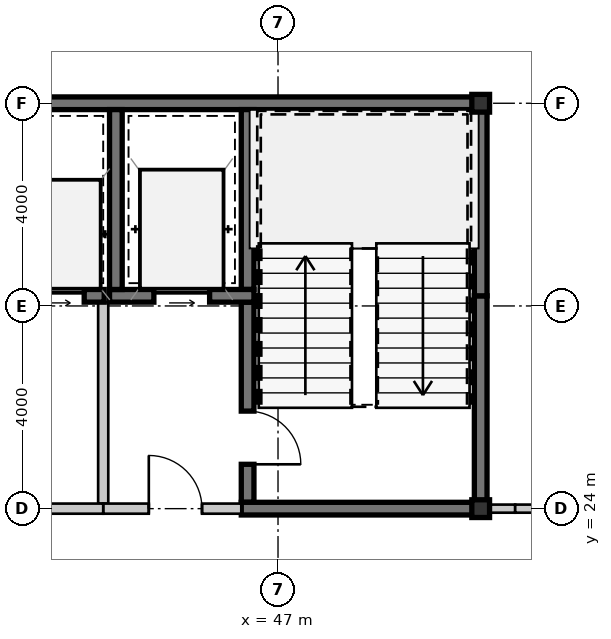
"""IFC4 building model, lengths in metres.
Left out: names, types, materials, properties, quantities, classifications, styles, units other than length and angle.
Written with IfcOpenShell. Run it as: python <this file> out.ifc"""

import sys

from ifc_helpers import new_model, si_unit, direction, frame, frame_2d, origin, origin_2d, place, context, subcontext, project, spatial, rectangle, hollow_rectangle, extrude, source, transform, mapped, element, fill, save


model = new_model("IFC4")
c1 = context("Model", 3, precision=1e-05, world=origin(), true_north=direction((0.0, 1.0)))
c2 = subcontext(c1, "Body", "Model", "MODEL_VIEW")
j1 = project(units=[si_unit("LENGTHUNIT", "METRE"), si_unit("PLANEANGLEUNIT", "RADIAN")], contexts=[c1])
p1 = place(None, origin())
s1 = spatial("IfcSite", under=j1, at=p1, CompositionType="ELEMENT")
p2 = place(p1, origin())
s2 = spatial("IfcBuilding", under=s1, at=p2, CompositionType="ELEMENT")
p3 = place(p2, frame((0.0, 0.0, 168.7)))
s3 = spatial("IfcBuildingStorey", under=s2, at=p3, CompositionType="ELEMENT", Elevation=168.7)
m1 = source(origin(), c2, "Body", "SweptSolid", [
    extrude(hollow_rectangle(XDim=0.35, YDim=0.35, WallThickness=0.016, at=origin_2d()), origin(), (0.0, 0.0, 1.0), 3.85),
])
for number, where, z_axis, x_axis in (
    (1, (51.0, 24.0, 0.0), (0.0, 0.0, 1.0), (1.0, 0.0, 0.0)),
    (2, (51.0, 32.0, 0.0), (0.0, 0.0, 1.0), (1.0, 0.0, 0.0)),
):
    element("IfcColumn", number, at=place(p3, frame(where, z_axis=z_axis, x_axis=x_axis)), inside=s3, PredefinedType="COLUMN", context=c2, shape_type="MappedRepresentation", body=[
        mapped(m1, transform((0.0, 0.0, 0.0), scale=1.0)),
    ])
m2 = source(origin(), c2, "Body", "SweptSolid", [
    extrude(rectangle(XDim=11.925, YDim=0.25, at=frame_2d((5.962, 0.0))), origin(), (0.0, 0.0, 1.0), 3.63),
])
p4 = place(p3, frame((39.2, 32.0, 0.0), z_axis=(0.0, 0.0, 1.0), x_axis=(1.0, 0.0, 0.0)))
e3 = element("IfcWall", 3, at=p4, inside=s3, PredefinedType="SHEAR", context=c2, shape_type="MappedRepresentation", body=[
    mapped(m2, transform((0.0, 0.0, 0.0), scale=1.0)),
])
m3 = source(origin(), c2, "Body", "SweptSolid", [
    extrude(rectangle(XDim=4.075, YDim=0.25, at=frame_2d((2.038, 0.0))), origin(), (0.0, 0.0, 1.0), 3.63),
])
p5 = place(p3, frame((51.0, 24.125, 0.0), z_axis=(0.0, 0.0, 1.0), x_axis=(0.0, 1.0, 0.0)))
e4 = element("IfcWall", 4, at=p5, inside=s3, PredefinedType="SHEAR", context=c2, shape_type="MappedRepresentation", body=[
    mapped(m3, transform((0.0, 0.0, 0.0), scale=1.0)),
])
m4 = source(origin(), c2, "Body", "SweptSolid", [
    extrude(rectangle(XDim=3.675, YDim=0.25, at=frame_2d((1.837, 0.0))), origin(), (0.0, 0.0, 1.0), 3.63),
])
p6 = place(p3, frame((51.0, 28.2, 0.0), z_axis=(0.0, 0.0, 1.0), x_axis=(0.0, 1.0, 0.0)))
e5 = element("IfcWall", 5, at=p6, inside=s3, PredefinedType="SHEAR", context=c2, shape_type="MappedRepresentation", body=[
    mapped(m4, transform((0.0, 0.0, 0.0), scale=1.0)),
])
m5 = source(origin(), c2, "Body", "SweptSolid", [
    extrude(rectangle(XDim=3.55, YDim=0.25, at=frame_2d((1.775, 0.0))), origin(), (0.0, 0.0, 1.0), 3.63),
])
p7 = place(p3, frame((46.4, 31.875, 0.0), z_axis=(0.0, 0.0, 1.0), x_axis=(0.0, -1.0, 0.0)))
e6 = element("IfcWall", 6, at=p7, inside=s3, PredefinedType="SHEAR", context=c2, shape_type="MappedRepresentation", body=[
    mapped(m5, transform((0.0, 0.0, 0.0), scale=1.0)),
])
m6 = source(origin(), c2, "Body", "SweptSolid", [
    extrude(rectangle(XDim=3.95, YDim=0.25, at=frame_2d((1.975, 0.0))), origin(), (0.0, 0.0, 1.0), 3.63),
])
p8 = place(p3, frame((46.4, 28.075, 0.0), z_axis=(0.0, 0.0, 1.0), x_axis=(0.0, -1.0, 0.0)))
e7 = element("IfcWall", 7, at=p8, inside=s3, PredefinedType="SHEAR", context=c2, shape_type="MappedRepresentation", body=[
    mapped(m6, transform((0.0, 0.0, 0.0), scale=1.0)),
])
m7 = source(origin(), c2, "Body", "SweptSolid", [
    extrude(rectangle(XDim=1.05, YDim=2.1, at=frame_2d((0.525, 1.05))), frame((0.0, 0.135, 0.0), z_axis=(0.0, -1.0, 0.0), x_axis=(1.0, 0.0, 0.0)), (0.0, 0.0, 1.0), 0.27),
])
p9 = place(p8, frame((2.15, 0.0, 0.0)))
e8 = element("IfcOpeningElement", 8, at=p9, cuts=e7, PredefinedType="OPENING", context=c2, shape_type="MappedRepresentation", body=[
    mapped(m7, transform((0.0, 0.0, 0.0), scale=1.0)),
])
m8 = source(origin(), c2, "Body", "SweptSolid", [
    extrude(rectangle(XDim=4.85, YDim=0.25, at=frame_2d((2.425, 0.0))), origin(), (0.0, 0.0, 1.0), 3.63),
])
p10 = place(p3, frame((46.275, 24.0, 0.0), z_axis=(0.0, 0.0, 1.0), x_axis=(1.0, 0.0, 0.0)))
e9 = element("IfcWall", 9, at=p10, inside=s3, PredefinedType="SHEAR", context=c2, shape_type="MappedRepresentation", body=[
    mapped(m8, transform((0.0, 0.0, 0.0), scale=1.0)),
])
m9 = source(origin(), c2, "Body", "SweptSolid", [
    extrude(rectangle(XDim=2.85, YDim=0.25, at=frame_2d((1.425, 0.0))), origin(), (0.0, 0.0, 1.0), 3.63),
])
p11 = place(p3, frame((43.675, 28.2, 0.0), z_axis=(0.0, 0.0, 1.0), x_axis=(1.0, 0.0, 0.0)))
e10 = element("IfcWall", 10, at=p11, inside=s3, PredefinedType="SHEAR", context=c2, shape_type="MappedRepresentation", body=[
    mapped(m9, transform((0.0, 0.0, 0.0), scale=1.0)),
])
m10 = source(origin(), c2, "Body", "SweptSolid", [
    extrude(rectangle(XDim=1.1, YDim=2.15, at=frame_2d((0.55, 1.075))), frame((0.0, 0.135, 0.0), z_axis=(0.0, -1.0, 0.0), x_axis=(1.0, 0.0, 0.0)), (0.0, 0.0, 1.0), 0.27),
])
p12 = place(p11, frame((0.875, 0.0, 0.0)))
e11 = element("IfcOpeningElement", 11, at=p12, cuts=e10, PredefinedType="OPENING", context=c2, shape_type="MappedRepresentation", body=[
    mapped(m10, transform((0.0, 0.0, 0.0), scale=1.0)),
])
p13 = place(p3, frame((43.8, 31.875, 0.0), z_axis=(0.0, 0.0, 1.0), x_axis=(0.0, -1.0, 0.0)))
e12 = element("IfcWall", 12, at=p13, inside=s3, PredefinedType="SHEAR", context=c2, shape_type="MappedRepresentation", body=[
    mapped(m5, transform((0.0, 0.0, 0.0), scale=1.0)),
])
m11 = source(origin(), c2, "Body", "SweptSolid", [
    extrude(rectangle(XDim=3.975, YDim=0.2, at=frame_2d((1.987, 0.0))), origin(), (0.0, 0.0, 1.0), 3.63),
])
p14 = place(p3, frame((43.55, 28.075, 0.0), z_axis=(0.0, 0.0, 1.0), x_axis=(0.0, -1.0, 0.0)))
e13 = element("IfcWall", 13, at=p14, inside=s3, PredefinedType="SOLIDWALL", context=c2, shape_type="MappedRepresentation", body=[
    mapped(m11, transform((0.0, 0.0, 0.0), scale=1.0)),
])
m12 = source(origin(), c2, "Body", "SweptSolid", [
    extrude(rectangle(XDim=2.725, YDim=0.2, at=frame_2d((1.362, 0.0))), origin(), (0.0, 0.0, 1.0), 3.097),
])
p15 = place(p3, frame((43.55, 24.0, 0.0), z_axis=(0.0, 0.0, 1.0), x_axis=(1.0, 0.0, 0.0)))
e14 = element("IfcWall", 14, at=p15, inside=s3, PredefinedType="SOLIDWALL", context=c2, shape_type="MappedRepresentation", body=[
    mapped(m12, transform((0.0, 0.0, 0.0), scale=1.0)),
])
m13 = source(origin(), c2, "Body", "SweptSolid", [
    extrude(rectangle(XDim=1.05, YDim=2.1, at=frame_2d((0.525, 1.05))), frame((0.0, 0.11, 0.0), z_axis=(0.0, -1.0, 0.0), x_axis=(1.0, 0.0, 0.0)), (0.0, 0.0, 1.0), 0.22),
])
p16 = place(p15, frame((0.9, 0.0, 0.0)))
e15 = element("IfcOpeningElement", 15, at=p16, cuts=e14, PredefinedType="OPENING", context=c2, shape_type="MappedRepresentation", body=[
    mapped(m13, transform((0.0, 0.0, 0.0), scale=1.0)),
])
m14 = source(origin(), c2, "Body", "SweptSolid", [
    extrude(rectangle(XDim=2.07, YDim=0.25, at=frame_2d((1.035, 0.0))), origin(), (0.0, 0.0, 1.0), 3.63),
])
p17 = place(p3, frame((41.5, 28.2, 0.0), z_axis=(0.0, 0.0, 1.0), x_axis=(1.0, 0.0, 0.0)))
e16 = element("IfcWall", 16, at=p17, inside=s3, PredefinedType="SHEAR", context=c2, shape_type="MappedRepresentation", body=[
    mapped(m14, transform((0.0, 0.0, 0.0), scale=1.0)),
])
m15 = source(origin(), c2, "Body", "SweptSolid", [
    extrude(rectangle(XDim=1.05, YDim=2.15, at=frame_2d((0.525, 1.075))), frame((0.0, 0.135, 0.0), z_axis=(0.0, -1.0, 0.0), x_axis=(1.0, 0.0, 0.0)), (0.0, 0.0, 1.0), 0.27),
])
p18 = place(p17, frame((0.625, 0.0, 0.0)))
e17 = element("IfcOpeningElement", 17, at=p18, cuts=e16, PredefinedType="OPENING", context=c2, shape_type="MappedRepresentation", body=[
    mapped(m15, transform((0.0, 0.0, 0.0), scale=1.0)),
])
m16 = source(origin(), c2, "Body", "SweptSolid", [
    extrude(rectangle(XDim=4.35, YDim=0.2, at=frame_2d((2.175, 0.0))), origin(), (0.0, 0.0, 1.0), 3.097),
])
p19 = place(p3, frame((43.55, 24.0, 0.0), z_axis=(0.0, 0.0, 1.0), x_axis=(-1.0, 0.0, 0.0)))
e18 = element("IfcWall", 18, at=p19, inside=s3, PredefinedType="SOLIDWALL", context=c2, shape_type="MappedRepresentation", body=[
    mapped(m16, transform((0.0, 0.0, 0.0), scale=1.0)),
])
p20 = place(p19, frame((1.65, 0.0, 0.0)))
e19 = element("IfcOpeningElement", 19, at=p20, cuts=e18, PredefinedType="OPENING", context=c2, shape_type="MappedRepresentation", body=[
    mapped(m13, transform((0.0, 0.0, 0.0), scale=1.0)),
])
m17 = source(origin(), c2, "Body", "SweptSolid", [
    extrude(rectangle(XDim=0.556, YDim=0.16, at=frame_2d((0.278, 0.0))), origin(), (0.0, 0.0, 1.0), 3.17),
])
p21 = place(p3, frame((51.125, 24.0, 0.0), z_axis=(0.0, 0.0, 1.0), x_axis=(1.0, 0.0, 0.0)))
e20 = element("IfcWall", 20, at=p21, inside=s3, PredefinedType="PARTITIONING", context=c2, shape_type="MappedRepresentation", body=[
    mapped(m17, transform((0.0, 0.0, 0.0), scale=1.0)),
])
m18 = source(origin(), c2, "Body", "SweptSolid", [
    extrude(rectangle(XDim=9.153, YDim=0.16, at=frame_2d((4.576, 0.0))), origin(), (0.0, 0.0, 1.0), 3.63),
])
p22 = place(p3, frame((51.681, 24.0, 0.0), z_axis=(0.0, 0.0, 1.0), x_axis=(1.0, 0.0, 0.0)))
e21 = element("IfcWall", 21, at=p22, inside=s3, PredefinedType="PARTITIONING", context=c2, shape_type="MappedRepresentation", body=[
    mapped(m18, transform((0.0, 0.0, 0.0), scale=1.0)),
])
m19 = source(origin(), c2, "Body", "SweptSolid", [
    extrude(rectangle(XDim=0.92, YDim=2.1, at=frame_2d((0.46, 1.05))), frame((0.0, 0.09, 0.0), z_axis=(0.0, -1.0, 0.0), x_axis=(1.0, 0.0, 0.0)), (0.0, 0.0, 1.0), 0.18),
])
p23 = place(p22, frame((3.786, 0.0, 0.0)))
e22 = element("IfcOpeningElement", 22, at=p23, cuts=e21, PredefinedType="OPENING", context=c2, shape_type="MappedRepresentation", body=[
    mapped(m19, transform((0.0, 0.0, 0.0), scale=1.0)),
])
m20 = source(origin(), c2, "Body", "SweptSolid", [
    extrude(rectangle(XDim=1.05, YDim=2.1, at=frame_2d((0.525, 1.05))), frame((0.0, 0.025, 0.0), z_axis=(0.0, -1.0, 0.0), x_axis=(1.0, 0.0, 0.0)), (0.0, 0.0, 1.0), 0.05),
])
p24 = place(p9, origin())
e23 = element("IfcDoor", 23, at=p24, inside=s3, OperationType="SINGLE_SWING_RIGHT", PredefinedType="DOOR", context=c2, shape_type="MappedRepresentation", body=[
    mapped(m20, transform((0.0, 0.0, 0.0), scale=1.0)),
])
fill(e8, e23)
m21 = source(origin(), c2, "Body", "SweptSolid", [
    extrude(rectangle(XDim=1.1, YDim=2.15, at=frame_2d((0.55, 1.075))), frame((0.0, 0.025, 0.0), z_axis=(0.0, -1.0, 0.0), x_axis=(1.0, 0.0, 0.0)), (0.0, 0.0, 1.0), 0.05),
])
p25 = place(p12, origin())
e24 = element("IfcDoor", 24, at=p25, inside=s3, OperationType="SLIDING_TO_LEFT", PredefinedType="DOOR", context=c2, shape_type="MappedRepresentation", body=[
    mapped(m21, transform((0.0, 0.0, 0.0), scale=1.0)),
])
fill(e11, e24)
p26 = place(p16, origin())
e25 = element("IfcDoor", 25, at=p26, inside=s3, OperationType="SINGLE_SWING_LEFT", PredefinedType="DOOR", context=c2, shape_type="MappedRepresentation", body=[
    mapped(m20, transform((0.0, 0.0, 0.0), scale=1.0)),
])
fill(e15, e25)
m22 = source(origin(), c2, "Body", "SweptSolid", [
    extrude(rectangle(XDim=1.05, YDim=2.15, at=frame_2d((0.525, 1.075))), frame((0.0, 0.025, 0.0), z_axis=(0.0, -1.0, 0.0), x_axis=(1.0, 0.0, 0.0)), (0.0, 0.0, 1.0), 0.05),
])
p27 = place(p18, origin())
e26 = element("IfcDoor", 26, at=p27, inside=s3, OperationType="SLIDING_TO_LEFT", PredefinedType="DOOR", context=c2, shape_type="MappedRepresentation", body=[
    mapped(m22, transform((0.0, 0.0, 0.0), scale=1.0)),
])
fill(e17, e26)
save(model, sys.argv[1])
